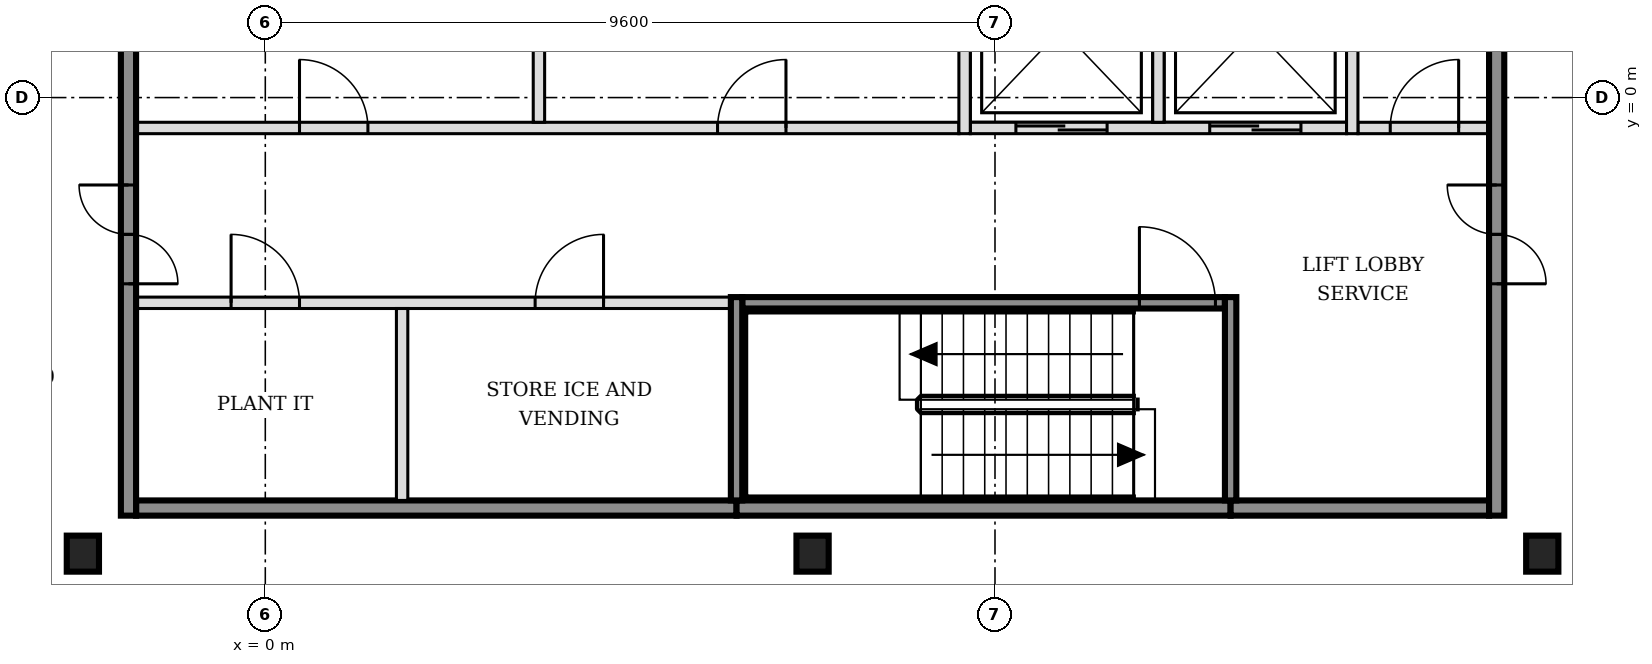
"""IFC4 building model, lengths in metres.
Left out: names, types, materials, properties, quantities, classifications, styles, units other than length and angle.
Written with IfcOpenShell. Run it as: python <this file> out.ifc"""

import sys

from ifc_helpers import new_model, si_unit, direction, frame, frame_2d, origin, origin_2d, place, context, subcontext, project, spatial, rectangle, i_section, extrude, element, fill, save


model = new_model("IFC4")
c1 = context("Model", 3, precision=1e-05, world=origin(), true_north=direction((0.0, 1.0)))
c2 = subcontext(c1, "Body", "Model", "MODEL_VIEW")
j1 = project(units=[si_unit("LENGTHUNIT", "METRE"), si_unit("PLANEANGLEUNIT", "RADIAN")], contexts=[c1])
p1 = place(None, origin())
s1 = spatial("IfcSite", under=j1, at=p1, CompositionType="ELEMENT")
p2 = place(p1, origin())
s2 = spatial("IfcBuilding", under=s1, at=p2, CompositionType="ELEMENT")
p3 = place(p2, frame((0.0, 0.0, 136.2)))
s3 = spatial("IfcBuildingStorey", under=s2, at=p3, CompositionType="ELEMENT", Elevation=136.2)
for number, where, z_axis, x_axis in (
    (1, (-2.4, -6.0, -0.15), (0.0, 0.0, 1.0), (1.0, 0.0, 0.0)),
    (2, (7.2, -6.0, -0.15), (0.0, 0.0, 1.0), (1.0, 0.0, 0.0)),
    (3, (16.8, -6.0, -0.15), (0.0, 0.0, 1.0), (1.0, 0.0, 0.0)),
):
    element("IfcColumn", number, at=place(p3, frame(where, z_axis=z_axis, x_axis=x_axis)), inside=s3, PredefinedType="COLUMN", context=c2, shape_type="SweptSolid", body=[
        extrude(i_section(OverallWidth=0.424, OverallDepth=0.474, WebThickness=0.048, FlangeThickness=0.077, FilletRadius=0.015, at=origin_2d()), origin(), (0.0, 0.0, 1.0), 3.6),
    ])
p4 = place(p3, frame((-1.7, -5.4, 0.0), z_axis=(0.0, 0.0, 1.0), x_axis=(1.0, 0.0, 0.0)))
e4 = element("IfcWall", 4, at=p4, inside=s3, PredefinedType="SOLIDWALL", context=c2, shape_type="SweptSolid", body=[
    extrude(rectangle(XDim=7.9, YDim=0.2, at=frame_2d((3.95, 0.0))), origin(), (0.0, 0.0, 1.0), 3.45),
])
p5 = place(p3, frame((6.2, -5.4, 0.0), z_axis=(0.0, 0.0, 1.0), x_axis=(1.0, 0.0, 0.0)))
e5 = element("IfcWall", 5, at=p5, inside=s3, PredefinedType="SOLIDWALL", context=c2, shape_type="SweptSolid", body=[
    extrude(rectangle(XDim=6.5, YDim=0.2, at=frame_2d((3.25, 0.0))), origin(), (0.0, 0.0, 1.0), 3.45),
])
p6 = place(p3, frame((12.7, -5.4, 0.0), z_axis=(0.0, 0.0, 1.0), x_axis=(1.0, 0.0, 0.0)))
e6 = element("IfcWall", 6, at=p6, inside=s3, PredefinedType="SOLIDWALL", context=c2, shape_type="SweptSolid", body=[
    extrude(rectangle(XDim=3.4, YDim=0.2, at=frame_2d((1.7, 0.0))), origin(), (0.0, 0.0, 1.0), 3.45),
])
p7 = place(p3, frame((-1.7, -2.7, 0.0), z_axis=(0.0, 0.0, 1.0), x_axis=(1.0, 0.0, 0.0)))
e7 = element("IfcWall", 7, at=p7, inside=s3, PredefinedType="PARTITIONING", context=c2, shape_type="SweptSolid", body=[
    extrude(rectangle(XDim=7.825, YDim=0.15, at=frame_2d((3.913, 0.0))), origin(), (0.0, 0.0, 1.0), 3.45),
])
p8 = place(p7, frame((1.25, 0.0, 0.0)))
e8 = element("IfcOpeningElement", 8, at=p8, cuts=e7, PredefinedType="OPENING", context=c2, shape_type="SweptSolid", body=[
    extrude(rectangle(XDim=0.9, YDim=2.1, at=frame_2d((0.45, 1.05))), frame((0.0, 0.085, 0.0), z_axis=(0.0, -1.0, 0.0), x_axis=(1.0, 0.0, 0.0)), (0.0, 0.0, 1.0), 0.17),
])
p9 = place(p7, frame((5.25, 0.0, 0.0)))
e9 = element("IfcOpeningElement", 9, at=p9, cuts=e7, PredefinedType="OPENING", context=c2, shape_type="SweptSolid", body=[
    extrude(rectangle(XDim=0.9, YDim=2.1, at=frame_2d((0.45, 1.05))), frame((0.0, 0.085, 0.0), z_axis=(0.0, -1.0, 0.0), x_axis=(1.0, 0.0, 0.0)), (0.0, 0.0, 1.0), 0.17),
])
p10 = place(p3, frame((6.275, -2.7, 0.0), z_axis=(0.0, 0.0, 1.0), x_axis=(1.0, 0.0, 0.0)))
e10 = element("IfcWall", 10, at=p10, inside=s3, PredefinedType="SOLIDWALL", context=c2, shape_type="SweptSolid", body=[
    extrude(rectangle(XDim=6.35, YDim=0.15, at=frame_2d((3.175, 0.0))), origin(), (0.0, 0.0, 1.0), 3.45),
])
p11 = place(p10, frame((5.225, 0.0, 0.0)))
e11 = element("IfcOpeningElement", 11, at=p11, cuts=e10, PredefinedType="OPENING", context=c2, shape_type="SweptSolid", body=[
    extrude(rectangle(XDim=1.0, YDim=2.1, at=frame_2d((0.5, 1.05))), frame((0.0, 0.085, 0.0), z_axis=(0.0, -1.0, 0.0), x_axis=(1.0, 0.0, 0.0)), (0.0, 0.0, 1.0), 0.17),
])
p12 = place(p3, frame((-1.7, -0.4, 0.0), z_axis=(0.0, 0.0, 1.0), x_axis=(1.0, 0.0, 0.0)))
e12 = element("IfcWall", 12, at=p12, inside=s3, PredefinedType="PARTITIONING", context=c2, shape_type="SweptSolid", body=[
    extrude(rectangle(XDim=10.825, YDim=0.15, at=frame_2d((5.413, 0.0))), origin(), (0.0, 0.0, 1.0), 3.45),
])
p13 = place(p12, frame((2.15, 0.0, 0.0)))
e13 = element("IfcOpeningElement", 13, at=p13, cuts=e12, PredefinedType="OPENING", context=c2, shape_type="SweptSolid", body=[
    extrude(rectangle(XDim=0.9, YDim=2.1, at=frame_2d((0.45, 1.05))), frame((0.0, 0.085, 0.0), z_axis=(0.0, -1.0, 0.0), x_axis=(1.0, 0.0, 0.0)), (0.0, 0.0, 1.0), 0.17),
])
p14 = place(p12, frame((7.65, 0.0, 0.0)))
e14 = element("IfcOpeningElement", 14, at=p14, cuts=e12, PredefinedType="OPENING", context=c2, shape_type="SweptSolid", body=[
    extrude(rectangle(XDim=0.9, YDim=2.1, at=frame_2d((0.45, 1.05))), frame((0.0, 0.085, 0.0), z_axis=(0.0, -1.0, 0.0), x_axis=(1.0, 0.0, 0.0)), (0.0, 0.0, 1.0), 0.17),
])
p15 = place(p3, frame((9.275, -0.4, 0.0), z_axis=(0.0, 0.0, 1.0), x_axis=(1.0, 0.0, 0.0)))
e15 = element("IfcWall", 15, at=p15, inside=s3, PredefinedType="SOLIDWALL", context=c2, shape_type="SweptSolid", body=[
    extrude(rectangle(XDim=4.95, YDim=0.15, at=frame_2d((2.475, 0.0))), origin(), (0.0, 0.0, 1.0), 3.45),
])
p16 = place(p15, frame((0.6, 0.0, 0.0)))
e16 = element("IfcOpeningElement", 16, at=p16, cuts=e15, PredefinedType="OPENING", context=c2, shape_type="SweptSolid", body=[
    extrude(rectangle(XDim=1.2, YDim=2.1, at=frame_2d((0.6, 1.05))), frame((0.0, 0.085, 0.0), z_axis=(0.0, -1.0, 0.0), x_axis=(1.0, 0.0, 0.0)), (0.0, 0.0, 1.0), 0.17),
])
p17 = place(p15, frame((3.15, 0.0, 0.0)))
e17 = element("IfcOpeningElement", 17, at=p17, cuts=e15, PredefinedType="OPENING", context=c2, shape_type="SweptSolid", body=[
    extrude(rectangle(XDim=1.2, YDim=2.1, at=frame_2d((0.6, 1.05))), frame((0.0, 0.085, 0.0), z_axis=(0.0, -1.0, 0.0), x_axis=(1.0, 0.0, 0.0)), (0.0, 0.0, 1.0), 0.17),
])
p18 = place(p3, frame((14.375, -0.4, 0.0), z_axis=(0.0, 0.0, 1.0), x_axis=(1.0, 0.0, 0.0)))
e18 = element("IfcWall", 18, at=p18, inside=s3, PredefinedType="PARTITIONING", context=c2, shape_type="SweptSolid", body=[
    extrude(rectangle(XDim=1.725, YDim=0.15, at=frame_2d((0.863, 0.0))), origin(), (0.0, 0.0, 1.0), 3.45),
])
p19 = place(p18, frame((0.425, 0.0, 0.0)))
e19 = element("IfcOpeningElement", 19, at=p19, cuts=e18, PredefinedType="OPENING", context=c2, shape_type="SweptSolid", body=[
    extrude(rectangle(XDim=0.9, YDim=2.1, at=frame_2d((0.45, 1.05))), frame((0.0, 0.085, 0.0), z_axis=(0.0, -1.0, 0.0), x_axis=(1.0, 0.0, 0.0)), (0.0, 0.0, 1.0), 0.17),
])
p20 = place(p3, frame((-1.8, -5.5, 0.0), z_axis=(0.0, 0.0, 1.0), x_axis=(0.0, 1.0, 0.0)))
e20 = element("IfcWall", 20, at=p20, inside=s3, PredefinedType="SOLIDWALL", context=c2, shape_type="SweptSolid", body=[
    extrude(rectangle(XDim=15.8, YDim=0.2, at=frame_2d((7.9, 0.0))), origin(), (0.0, 0.0, 1.0), 3.45),
])
p21 = place(p20, frame((3.05, 0.0, 0.0)))
e21 = element("IfcOpeningElement", 21, at=p21, cuts=e20, PredefinedType="OPENING", context=c2, shape_type="SweptSolid", body=[
    extrude(rectangle(XDim=1.3, YDim=2.1, at=frame_2d((0.65, 1.05))), frame((0.0, 0.11, 0.0), z_axis=(0.0, -1.0, 0.0), x_axis=(1.0, 0.0, 0.0)), (0.0, 0.0, 1.0), 0.22),
])
p22 = place(p20, frame((11.45, 0.0, 0.0)))
e22 = element("IfcOpeningElement", 22, at=p22, cuts=e20, PredefinedType="OPENING", context=c2, shape_type="SweptSolid", body=[
    extrude(rectangle(XDim=1.3, YDim=2.1, at=frame_2d((0.65, 1.05))), frame((0.0, 0.11, 0.0), z_axis=(0.0, -1.0, 0.0), x_axis=(1.0, 0.0, 0.0)), (0.0, 0.0, 1.0), 0.22),
])
p23 = place(p3, frame((1.8, -5.3, 0.0), z_axis=(0.0, 0.0, 1.0), x_axis=(0.0, 1.0, 0.0)))
e23 = element("IfcWall", 23, at=p23, inside=s3, PredefinedType="PARTITIONING", context=c2, shape_type="SweptSolid", body=[
    extrude(rectangle(XDim=2.525, YDim=0.15, at=frame_2d((1.263, 0.0))), origin(), (0.0, 0.0, 1.0), 3.45),
])
p24 = place(p3, frame((3.6, -0.325, 0.0), z_axis=(0.0, 0.0, 1.0), x_axis=(0.0, 1.0, 0.0)))
e24 = element("IfcWall", 24, at=p24, inside=s3, PredefinedType="PARTITIONING", context=c2, shape_type="SweptSolid", body=[
    extrude(rectangle(XDim=2.45, YDim=0.15, at=frame_2d((1.225, 0.0))), origin(), (0.0, 0.0, 1.0), 3.45),
])
p25 = place(p3, frame((6.2, -5.3, 0.0), z_axis=(0.0, 0.0, 1.0), x_axis=(0.0, 1.0, 0.0)))
e25 = element("IfcWall", 25, at=p25, inside=s3, PredefinedType="SOLIDWALL", context=c2, shape_type="SweptSolid", body=[
    extrude(rectangle(XDim=2.675, YDim=0.15, at=frame_2d((1.337, 0.0))), origin(), (0.0, 0.0, 1.0), 3.45),
])
p26 = place(p3, frame((9.2, -0.475, 0.0), z_axis=(0.0, 0.0, 1.0), x_axis=(0.0, 1.0, 0.0)))
e26 = element("IfcWall", 26, at=p26, inside=s3, PredefinedType="SOLIDWALL", context=c2, shape_type="SweptSolid", body=[
    extrude(rectangle(XDim=2.6, YDim=0.15, at=frame_2d((1.3, 0.0))), origin(), (0.0, 0.0, 1.0), 3.45),
])
p27 = place(p3, frame((11.75, -0.325, 0.0), z_axis=(0.0, 0.0, 1.0), x_axis=(0.0, 1.0, 0.0)))
e27 = element("IfcWall", 27, at=p27, inside=s3, PredefinedType="SOLIDWALL", context=c2, shape_type="SweptSolid", body=[
    extrude(rectangle(XDim=2.45, YDim=0.15, at=frame_2d((1.225, 0.0))), origin(), (0.0, 0.0, 1.0), 3.45),
])
p28 = place(p3, frame((12.7, -5.3, 0.0), z_axis=(0.0, 0.0, 1.0), x_axis=(0.0, 1.0, 0.0)))
e28 = element("IfcWall", 28, at=p28, inside=s3, PredefinedType="SOLIDWALL", context=c2, shape_type="SweptSolid", body=[
    extrude(rectangle(XDim=2.675, YDim=0.15, at=frame_2d((1.337, 0.0))), origin(), (0.0, 0.0, 1.0), 3.45),
])
p29 = place(p3, frame((14.3, -0.475, 0.0), z_axis=(0.0, 0.0, 1.0), x_axis=(0.0, 1.0, 0.0)))
e29 = element("IfcWall", 29, at=p29, inside=s3, PredefinedType="SOLIDWALL", context=c2, shape_type="SweptSolid", body=[
    extrude(rectangle(XDim=2.75, YDim=0.15, at=frame_2d((1.375, 0.0))), origin(), (0.0, 0.0, 1.0), 3.45),
])
p30 = place(p3, frame((16.2, -5.5, 0.0), z_axis=(0.0, 0.0, 1.0), x_axis=(0.0, 1.0, 0.0)))
e30 = element("IfcWall", 30, at=p30, inside=s3, PredefinedType="SOLIDWALL", context=c2, shape_type="SweptSolid", body=[
    extrude(rectangle(XDim=15.8, YDim=0.2, at=frame_2d((7.9, 0.0))), origin(), (0.0, 0.0, 1.0), 3.45),
])
p31 = place(p30, frame((3.05, 0.0, 0.0)))
e31 = element("IfcOpeningElement", 31, at=p31, cuts=e30, PredefinedType="OPENING", context=c2, shape_type="SweptSolid", body=[
    extrude(rectangle(XDim=1.3, YDim=2.1, at=frame_2d((0.65, 1.05))), frame((0.0, 0.11, 0.0), z_axis=(0.0, -1.0, 0.0), x_axis=(1.0, 0.0, 0.0)), (0.0, 0.0, 1.0), 0.22),
])
p32 = place(p30, frame((11.45, 0.0, 0.0)))
e32 = element("IfcOpeningElement", 32, at=p32, cuts=e30, PredefinedType="OPENING", context=c2, shape_type="SweptSolid", body=[
    extrude(rectangle(XDim=1.3, YDim=2.1, at=frame_2d((0.65, 1.05))), frame((0.0, 0.11, 0.0), z_axis=(0.0, -1.0, 0.0), x_axis=(1.0, 0.0, 0.0)), (0.0, 0.0, 1.0), 0.22),
])
p33 = place(p16, origin())
e33 = element("IfcDoor", 33, at=p33, inside=s3, OperationType="DOUBLE_DOOR_SLIDING", PredefinedType="DOOR", context=c2, shape_type="SweptSolid", body=[
    extrude(rectangle(XDim=1.2, YDim=2.1, at=frame_2d((0.6, 1.05))), frame((0.0, 0.025, 0.0), z_axis=(0.0, -1.0, 0.0), x_axis=(1.0, 0.0, 0.0)), (0.0, 0.0, 1.0), 0.05),
])
fill(e16, e33)
p34 = place(p17, origin())
e34 = element("IfcDoor", 34, at=p34, inside=s3, OperationType="DOUBLE_DOOR_SLIDING", PredefinedType="DOOR", context=c2, shape_type="SweptSolid", body=[
    extrude(rectangle(XDim=1.2, YDim=2.1, at=frame_2d((0.6, 1.05))), frame((0.0, 0.025, 0.0), z_axis=(0.0, -1.0, 0.0), x_axis=(1.0, 0.0, 0.0)), (0.0, 0.0, 1.0), 0.05),
])
fill(e17, e34)
p35 = place(p11, origin())
e35 = element("IfcDoor", 35, at=p35, inside=s3, OperationType="SINGLE_SWING_LEFT", PredefinedType="DOOR", context=c2, shape_type="SweptSolid", body=[
    extrude(rectangle(XDim=1.0, YDim=2.1, at=frame_2d((0.5, 1.05))), frame((0.0, 0.025, 0.0), z_axis=(0.0, -1.0, 0.0), x_axis=(1.0, 0.0, 0.0)), (0.0, 0.0, 1.0), 0.05),
])
fill(e11, e35)
p36 = place(p21, origin())
e36 = element("IfcDoor", 36, at=p36, inside=s3, OperationType="DOUBLE_DOOR_SINGLE_SWING", PredefinedType="DOOR", context=c2, shape_type="SweptSolid", body=[
    extrude(rectangle(XDim=1.3, YDim=2.1, at=frame_2d((0.65, 1.05))), frame((0.0, 0.025, 0.0), z_axis=(0.0, -1.0, 0.0), x_axis=(1.0, 0.0, 0.0)), (0.0, 0.0, 1.0), 0.05),
])
fill(e21, e36)
p37 = place(p31, origin())
e37 = element("IfcDoor", 37, at=p37, inside=s3, OperationType="DOUBLE_DOOR_SINGLE_SWING", PredefinedType="DOOR", context=c2, shape_type="SweptSolid", body=[
    extrude(rectangle(XDim=1.3, YDim=2.1, at=frame_2d((0.65, 1.05))), frame((0.0, 0.025, 0.0), z_axis=(0.0, -1.0, 0.0), x_axis=(1.0, 0.0, 0.0)), (0.0, 0.0, 1.0), 0.05),
])
fill(e31, e37)
p38 = place(p19, origin())
e38 = element("IfcDoor", 38, at=p38, inside=s3, OperationType="SINGLE_SWING_RIGHT", PredefinedType="DOOR", context=c2, shape_type="SweptSolid", body=[
    extrude(rectangle(XDim=0.9, YDim=2.1, at=frame_2d((0.45, 1.05))), frame((0.0, 0.025, 0.0), z_axis=(0.0, -1.0, 0.0), x_axis=(1.0, 0.0, 0.0)), (0.0, 0.0, 1.0), 0.05),
])
fill(e19, e38)
p39 = place(p8, origin())
e39 = element("IfcDoor", 39, at=p39, inside=s3, OperationType="SINGLE_SWING_LEFT", PredefinedType="DOOR", context=c2, shape_type="SweptSolid", body=[
    extrude(rectangle(XDim=0.9, YDim=2.1, at=frame_2d((0.45, 1.05))), frame((0.0, 0.025, 0.0), z_axis=(0.0, -1.0, 0.0), x_axis=(1.0, 0.0, 0.0)), (0.0, 0.0, 1.0), 0.05),
])
fill(e8, e39)
p40 = place(p9, origin())
e40 = element("IfcDoor", 40, at=p40, inside=s3, OperationType="SINGLE_SWING_RIGHT", PredefinedType="DOOR", context=c2, shape_type="SweptSolid", body=[
    extrude(rectangle(XDim=0.9, YDim=2.1, at=frame_2d((0.45, 1.05))), frame((0.0, 0.025, 0.0), z_axis=(0.0, -1.0, 0.0), x_axis=(1.0, 0.0, 0.0)), (0.0, 0.0, 1.0), 0.05),
])
fill(e9, e40)
p41 = place(p13, origin())
e41 = element("IfcDoor", 41, at=p41, inside=s3, OperationType="SINGLE_SWING_LEFT", PredefinedType="DOOR", context=c2, shape_type="SweptSolid", body=[
    extrude(rectangle(XDim=0.9, YDim=2.1, at=frame_2d((0.45, 1.05))), frame((0.0, 0.025, 0.0), z_axis=(0.0, -1.0, 0.0), x_axis=(1.0, 0.0, 0.0)), (0.0, 0.0, 1.0), 0.05),
])
fill(e13, e41)
p42 = place(p14, origin())
e42 = element("IfcDoor", 42, at=p42, inside=s3, OperationType="SINGLE_SWING_RIGHT", PredefinedType="DOOR", context=c2, shape_type="SweptSolid", body=[
    extrude(rectangle(XDim=0.9, YDim=2.1, at=frame_2d((0.45, 1.05))), frame((0.0, 0.025, 0.0), z_axis=(0.0, -1.0, 0.0), x_axis=(1.0, 0.0, 0.0)), (0.0, 0.0, 1.0), 0.05),
])
fill(e14, e42)
save(model, sys.argv[1])
